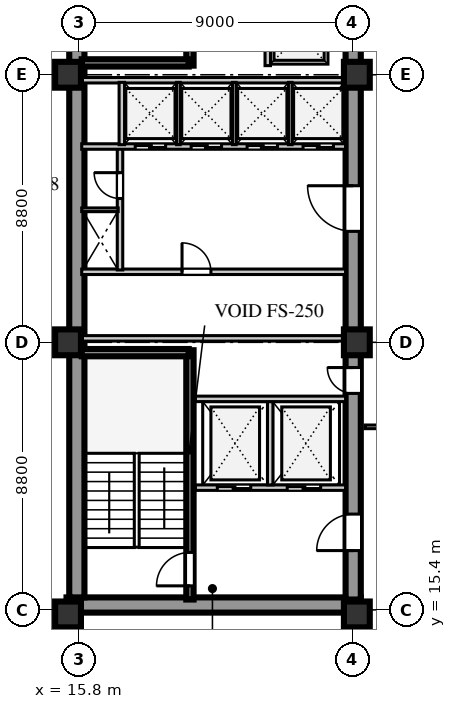
"""IFC4 building model, lengths in metres.
Left out: names, types, materials, properties, quantities, classifications, styles, units other than length and angle.
Written with IfcOpenShell. Run it as: python <this file> out.ifc"""

import sys

from ifc_helpers import new_model, si_unit, direction, frame, frame_2d, origin, origin_2d, place, context, subcontext, project, spatial, rectangle, extrude, element, fill, save


model = new_model("IFC4")
c1 = context("Model", 3, precision=1e-05, world=origin(), true_north=direction((0.0, 1.0)))
c2 = subcontext(c1, "Body", "Model", "MODEL_VIEW")
j1 = project(units=[si_unit("LENGTHUNIT", "METRE"), si_unit("PLANEANGLEUNIT", "RADIAN")], contexts=[c1])
p1 = place(None, origin())
s1 = spatial("IfcSite", under=j1, at=p1, CompositionType="ELEMENT")
p2 = place(p1, origin())
s2 = spatial("IfcBuilding", under=s1, at=p2, CompositionType="ELEMENT")
p3 = place(p2, frame((0.0, 0.0, 173.3)))
s3 = spatial("IfcBuildingStorey", under=s2, at=p3, CompositionType="ELEMENT", Elevation=173.3)
p4 = place(p3, frame((15.4, 15.56, 0.0), z_axis=(0.0, 0.0, 1.0), x_axis=(1.0, 0.0, 0.0)))
e1 = element("IfcWall", 1, at=p4, inside=s3, PredefinedType="SHEAR", context=c2, shape_type="SweptSolid", body=[
    extrude(rectangle(XDim=9.68, YDim=0.5, at=frame_2d((4.84, 0.0))), origin(), (0.0, 0.0, 1.0), 3.6),
])
p5 = place(p3, frame((15.74, 15.81, 0.0), z_axis=(0.0, 0.0, 1.0), x_axis=(0.0, 1.0, 0.0)))
e2 = element("IfcWall", 2, at=p5, inside=s3, PredefinedType="SHEAR", context=c2, shape_type="SweptSolid", body=[
    extrude(rectangle(XDim=25.63, YDim=0.5, at=frame_2d((12.815, 0.0))), origin(), (0.0, 0.0, 1.0), 3.6),
])
p6 = place(p3, frame((24.83, 15.74, 0.0), z_axis=(0.0, 0.0, 1.0), x_axis=(0.0, 1.0, 0.0)))
e3 = element("IfcWall", 3, at=p6, inside=s3, PredefinedType="SHEAR", context=c2, shape_type="SweptSolid", body=[
    extrude(rectangle(XDim=25.76, YDim=0.5, at=frame_2d((12.88, 0.0))), origin(), (0.0, 0.0, 1.0), 3.6),
])
p7 = place(p6, frame((1.61, 0.0, 0.0)))
e4 = element("IfcOpeningElement", 4, at=p7, cuts=e3, PredefinedType="OPENING", context=c2, shape_type="SweptSolid", body=[
    extrude(rectangle(XDim=1.2, YDim=2.1, at=frame_2d((0.6, 1.05))), frame((0.0, 0.26, 0.0), z_axis=(0.0, -1.0, 0.0), x_axis=(1.0, 0.0, 0.0)), (0.0, 0.0, 1.0), 0.52),
])
p8 = place(p6, frame((6.78, 0.0, 0.0)))
e5 = element("IfcOpeningElement", 5, at=p8, cuts=e3, PredefinedType="OPENING", context=c2, shape_type="SweptSolid", body=[
    extrude(rectangle(XDim=0.85, YDim=2.06, at=frame_2d((0.425, 1.03))), frame((0.0, 0.26, 0.0), z_axis=(0.0, -1.0, 0.0), x_axis=(1.0, 0.0, 0.0)), (0.0, 0.0, 1.0), 0.52),
])
p9 = place(p6, frame((12.11, 0.0, 0.0)))
e6 = element("IfcOpeningElement", 6, at=p9, cuts=e3, PredefinedType="OPENING", context=c2, shape_type="SweptSolid", body=[
    extrude(rectangle(XDim=1.5, YDim=2.12, at=frame_2d((0.75, 1.06))), frame((0.0, 0.26, 0.0), z_axis=(0.0, -1.0, 0.0), x_axis=(1.0, 0.0, 0.0)), (0.0, 0.0, 1.0), 0.52),
])
p10 = place(p6, frame((20.11, 0.0, 0.0)))
e7 = element("IfcOpeningElement", 7, at=p10, cuts=e3, PredefinedType="OPENING", context=c2, shape_type="SweptSolid", body=[
    extrude(rectangle(XDim=1.2, YDim=2.12, at=frame_2d((0.6, 1.06))), frame((0.0, 0.26, 0.0), z_axis=(0.0, -1.0, 0.0), x_axis=(1.0, 0.0, 0.0)), (0.0, 0.0, 1.0), 0.52),
])
p11 = place(p6, frame((24.01, 0.0, 0.0)))
e8 = element("IfcOpeningElement", 8, at=p11, cuts=e3, PredefinedType="OPENING", context=c2, shape_type="SweptSolid", body=[
    extrude(rectangle(XDim=0.95, YDim=2.1, at=frame_2d((0.475, 1.05))), frame((0.0, 0.26, 0.0), z_axis=(0.0, -1.0, 0.0), x_axis=(1.0, 0.0, 0.0)), (0.0, 0.0, 1.0), 0.52),
])
for number, where, z_axis, x_axis in (
    (9, (15.45, 15.25, 0.0), (0.0, 0.0, 1.0), (1.0, 0.0, 0.0)),
    (10, (15.45, 24.2, 0.0), (0.0, 0.0, 1.0), (1.0, 0.0, 0.0)),
    (11, (15.45, 33.0, 0.0), (0.0, 0.0, 1.0), (1.0, 0.0, 0.0)),
    (12, (24.95, 15.25, 0.0), (0.0, 0.0, 1.0), (1.0, 0.0, 0.0)),
    (13, (24.95, 24.2, 0.0), (0.0, 0.0, 1.0), (1.0, 0.0, 0.0)),
    (14, (24.95, 33.0, 0.0), (0.0, 0.0, 1.0), (1.0, 0.0, 0.0)),
):
    element("IfcColumn", number, at=place(p3, frame(where, z_axis=z_axis, x_axis=x_axis)), inside=s3, PredefinedType="COLUMN", context=c2, shape_type="SweptSolid", body=[
        extrude(rectangle(XDim=0.85, YDim=0.85, at=origin_2d()), origin(), (0.0, 0.0, 1.0), 3.6),
    ])
p12 = place(p3, frame((19.46, 15.74, 0.0), z_axis=(0.0, 0.0, 1.0), x_axis=(0.0, 1.0, 0.0)))
e15 = element("IfcWall", 15, at=p12, inside=s3, PredefinedType="SHEAR", context=c2, shape_type="SweptSolid", body=[
    extrude(rectangle(XDim=8.2, YDim=0.24, at=frame_2d((4.1, 0.0))), origin(), (0.0, 0.0, 1.0), 3.85),
])
p13 = place(p12, frame((0.45, 0.0, 0.0)))
e16 = element("IfcOpeningElement", 16, at=p13, cuts=e15, PredefinedType="OPENING", context=c2, shape_type="SweptSolid", body=[
    extrude(rectangle(XDim=1.1, YDim=2.1, at=frame_2d((0.55, 1.05))), frame((0.0, 0.13, 0.0), z_axis=(0.0, -1.0, 0.0), x_axis=(1.0, 0.0, 0.0)), (0.0, 0.0, 1.0), 0.26),
])
p14 = place(p3, frame((15.9, 23.86, 0.0), z_axis=(0.0, 0.0, 1.0), x_axis=(1.0, 0.0, 0.0)))
e17 = element("IfcWall", 17, at=p14, inside=s3, PredefinedType="SHEAR", context=c2, shape_type="SweptSolid", body=[
    extrude(rectangle(XDim=3.52, YDim=0.24, at=frame_2d((1.76, 0.0))), origin(), (0.0, 0.0, 1.0), 3.85),
])
p15 = place(p3, frame((19.64, 19.42, 0.0), z_axis=(0.0, 0.0, 1.0), x_axis=(1.0, 0.0, 0.0)))
e18 = element("IfcWall", 18, at=p15, inside=s3, PredefinedType="SOLIDWALL", context=c2, shape_type="SweptSolid", body=[
    extrude(rectangle(XDim=4.94, YDim=0.18, at=frame_2d((2.47, 0.0))), origin(), (0.0, 0.0, 1.0), 3.6),
])
p16 = place(p15, frame((0.72, 0.0, 0.0)))
e19 = element("IfcOpeningElement", 19, at=p16, cuts=e18, PredefinedType="OPENING", context=c2, shape_type="SweptSolid", body=[
    extrude(rectangle(XDim=1.1, YDim=2.1, at=frame_2d((0.55, 1.05))), frame((0.0, 0.1, 0.0), z_axis=(0.0, -1.0, 0.0), x_axis=(1.0, 0.0, 0.0)), (0.0, 0.0, 1.0), 0.2),
])
p17 = place(p15, frame((3.02, 0.0, 0.0)))
e20 = element("IfcOpeningElement", 20, at=p17, cuts=e18, PredefinedType="OPENING", context=c2, shape_type="SweptSolid", body=[
    extrude(rectangle(XDim=1.1, YDim=2.1, at=frame_2d((0.55, 1.05))), frame((0.0, 0.1, 0.0), z_axis=(0.0, -1.0, 0.0), x_axis=(1.0, 0.0, 0.0)), (0.0, 0.0, 1.0), 0.2),
])
p18 = place(p3, frame((22.1, 19.51, 0.0), z_axis=(0.0, 0.0, 1.0), x_axis=(0.0, 1.0, 0.0)))
e21 = element("IfcWall", 21, at=p18, inside=s3, PredefinedType="SOLIDWALL", context=c2, shape_type="SweptSolid", body=[
    extrude(rectangle(XDim=2.74, YDim=0.18, at=frame_2d((1.37, 0.0))), origin(), (0.0, 0.0, 1.0), 3.6),
])
p19 = place(p3, frame((19.64, 22.34, 0.0), z_axis=(0.0, 0.0, 1.0), x_axis=(1.0, 0.0, 0.0)))
e22 = element("IfcWall", 22, at=p19, inside=s3, PredefinedType="SOLIDWALL", context=c2, shape_type="SweptSolid", body=[
    extrude(rectangle(XDim=4.94, YDim=0.18, at=frame_2d((2.47, 0.0))), origin(), (0.0, 0.0, 1.0), 3.6),
])
p20 = place(p3, frame((15.9, 26.52, 0.0), z_axis=(0.0, 0.0, 1.0), x_axis=(1.0, 0.0, 0.0)))
e23 = element("IfcWall", 23, at=p20, inside=s3, PredefinedType="SOLIDWALL", context=c2, shape_type="SweptSolid", body=[
    extrude(rectangle(XDim=8.68, YDim=0.18, at=frame_2d((4.34, 0.0))), origin(), (0.0, 0.0, 1.0), 3.6),
])
p21 = place(p20, frame((3.3, 0.0, 0.0)))
e24 = element("IfcOpeningElement", 24, at=p21, cuts=e23, PredefinedType="OPENING", context=c2, shape_type="SweptSolid", body=[
    extrude(rectangle(XDim=0.95, YDim=2.1, at=frame_2d((0.475, 1.05))), frame((0.0, 0.1, 0.0), z_axis=(0.0, -1.0, 0.0), x_axis=(1.0, 0.0, 0.0)), (0.0, 0.0, 1.0), 0.2),
])
p22 = place(p3, frame((15.9, 24.33, 0.0), z_axis=(0.0, 0.0, 1.0), x_axis=(1.0, 0.0, 0.0)))
e25 = element("IfcWall", 25, at=p22, inside=s3, PredefinedType="SOLIDWALL", context=c2, shape_type="SweptSolid", body=[
    extrude(rectangle(XDim=8.68, YDim=0.18, at=frame_2d((4.34, 0.0))), origin(), (0.0, 0.0, 1.0), 2.95),
])
p23 = place(p3, frame((17.16, 26.58, 0.0), z_axis=(0.0, 0.0, 1.0), x_axis=(0.0, 1.0, 0.0)))
e26 = element("IfcWall", 26, at=p23, inside=s3, PredefinedType="SOLIDWALL", context=c2, shape_type="SweptSolid", body=[
    extrude(rectangle(XDim=4.02, YDim=0.18, at=frame_2d((2.01, 0.0))), origin(), (0.0, 0.0, 1.0), 3.6),
])
p24 = place(p23, frame((2.35, 0.0, 0.0)))
e27 = element("IfcOpeningElement", 27, at=p24, cuts=e26, PredefinedType="OPENING", context=c2, shape_type="SweptSolid", body=[
    extrude(rectangle(XDim=0.85, YDim=2.06, at=frame_2d((0.425, 1.03))), frame((0.0, 0.1, 0.0), z_axis=(0.0, -1.0, 0.0), x_axis=(1.0, 0.0, 0.0)), (0.0, 0.0, 1.0), 0.2),
])
p25 = place(p3, frame((15.9, 28.56, 0.0), z_axis=(0.0, 0.0, 1.0), x_axis=(1.0, 0.0, 0.0)))
e28 = element("IfcWall", 28, at=p25, inside=s3, PredefinedType="PARTITIONING", context=c2, shape_type="SweptSolid", body=[
    extrude(rectangle(XDim=1.2, YDim=0.12, at=frame_2d((0.6, 0.0))), origin(), (0.0, 0.0, 1.0), 3.6),
])
p26 = place(p3, frame((15.9, 30.64, 0.0), z_axis=(0.0, 0.0, 1.0), x_axis=(1.0, 0.0, 0.0)))
e29 = element("IfcWall", 29, at=p26, inside=s3, PredefinedType="SOLIDWALL", context=c2, shape_type="SweptSolid", body=[
    extrude(rectangle(XDim=8.68, YDim=0.18, at=frame_2d((4.34, 0.0))), origin(), (0.0, 0.0, 1.0), 3.6),
])
p27 = place(p26, frame((1.76, 0.0, 0.0)))
e30 = element("IfcOpeningElement", 30, at=p27, cuts=e29, PredefinedType="OPENING", context=c2, shape_type="SweptSolid", body=[
    extrude(rectangle(XDim=1.0, YDim=2.1, at=frame_2d((0.5, 1.05))), frame((0.0, 0.1, 0.0), z_axis=(0.0, -1.0, 0.0), x_axis=(1.0, 0.0, 0.0)), (0.0, 0.0, 1.0), 0.2),
])
p28 = place(p26, frame((3.6, 0.0, 0.0)))
e31 = element("IfcOpeningElement", 31, at=p28, cuts=e29, PredefinedType="OPENING", context=c2, shape_type="SweptSolid", body=[
    extrude(rectangle(XDim=1.0, YDim=2.1, at=frame_2d((0.5, 1.05))), frame((0.0, 0.1, 0.0), z_axis=(0.0, -1.0, 0.0), x_axis=(1.0, 0.0, 0.0)), (0.0, 0.0, 1.0), 0.2),
])
p29 = place(p26, frame((5.44, 0.0, 0.0)))
e32 = element("IfcOpeningElement", 32, at=p29, cuts=e29, PredefinedType="OPENING", context=c2, shape_type="SweptSolid", body=[
    extrude(rectangle(XDim=1.0, YDim=2.1, at=frame_2d((0.5, 1.05))), frame((0.0, 0.1, 0.0), z_axis=(0.0, -1.0, 0.0), x_axis=(1.0, 0.0, 0.0)), (0.0, 0.0, 1.0), 0.2),
])
p30 = place(p26, frame((7.28, 0.0, 0.0)))
e33 = element("IfcOpeningElement", 33, at=p30, cuts=e29, PredefinedType="OPENING", context=c2, shape_type="SweptSolid", body=[
    extrude(rectangle(XDim=1.0, YDim=2.1, at=frame_2d((0.5, 1.05))), frame((0.0, 0.1, 0.0), z_axis=(0.0, -1.0, 0.0), x_axis=(1.0, 0.0, 0.0)), (0.0, 0.0, 1.0), 0.2),
])
p31 = place(p3, frame((15.9, 32.82, 0.0), z_axis=(0.0, 0.0, 1.0), x_axis=(1.0, 0.0, 0.0)))
e34 = element("IfcWall", 34, at=p31, inside=s3, PredefinedType="SOLIDWALL", context=c2, shape_type="SweptSolid", body=[
    extrude(rectangle(XDim=8.68, YDim=0.18, at=frame_2d((4.34, 0.0))), origin(), (0.0, 0.0, 1.0), 2.95),
])
p32 = place(p3, frame((17.22, 30.7, 0.0), z_axis=(0.0, 0.0, 1.0), x_axis=(0.0, 1.0, 0.0)))
e35 = element("IfcWall", 35, at=p32, inside=s3, PredefinedType="SOLIDWALL", context=c2, shape_type="SweptSolid", body=[
    extrude(rectangle(XDim=2.05, YDim=0.18, at=frame_2d((1.025, 0.0))), origin(), (0.0, 0.0, 1.0), 3.6),
])
for number, where, z_axis, x_axis in (
    (36, (19.08, 30.7, 0.0), (0.0, 0.0, 1.0), (0.0, 1.0, 0.0)),
    (37, (20.92, 30.7, 0.0), (0.0, 0.0, 1.0), (0.0, 1.0, 0.0)),
    (38, (22.76, 30.7, 0.0), (0.0, 0.0, 1.0), (0.0, 1.0, 0.0)),
):
    element("IfcWall", number, at=place(p3, frame(where, z_axis=z_axis, x_axis=x_axis)), inside=s3, PredefinedType="PARTITIONING", context=c2, shape_type="SweptSolid", body=[
        extrude(rectangle(XDim=2.05, YDim=0.12, at=frame_2d((1.025, 0.0))), origin(), (0.0, 0.0, 1.0), 3.6),
    ])
p33 = place(p3, frame((19.46, 33.3, 0.0), z_axis=(0.0, 0.0, 1.0), x_axis=(0.0, 1.0, 0.0)))
e39 = element("IfcWall", 39, at=p33, inside=s3, PredefinedType="SHEAR", context=c2, shape_type="SweptSolid", body=[
    extrude(rectangle(XDim=8.18, YDim=0.24, at=frame_2d((4.09, 0.0))), origin(), (0.0, 0.0, 1.0), 3.85),
])
p34 = place(p33, frame((0.65, 0.0, 0.0)))
e40 = element("IfcOpeningElement", 40, at=p34, cuts=e39, PredefinedType="OPENING", context=c2, shape_type="SweptSolid", body=[
    extrude(rectangle(XDim=1.1, YDim=2.1, at=frame_2d((0.55, 1.05))), frame((0.0, 0.13, 0.0), z_axis=(0.0, -1.0, 0.0), x_axis=(1.0, 0.0, 0.0)), (0.0, 0.0, 1.0), 0.26),
])
p35 = place(p3, frame((15.9, 33.39, 0.0), z_axis=(0.0, 0.0, 1.0), x_axis=(1.0, 0.0, 0.0)))
e41 = element("IfcWall", 41, at=p35, inside=s3, PredefinedType="SHEAR", context=c2, shape_type="SweptSolid", body=[
    extrude(rectangle(XDim=3.52, YDim=0.24, at=frame_2d((1.76, 0.0))), origin(), (0.0, 0.0, 1.0), 3.85),
])
p36 = place(p3, frame((22.02, 33.3, 0.0), z_axis=(0.0, 0.0, 1.0), x_axis=(0.0, 1.0, 0.0)))
e42 = element("IfcWall", 42, at=p36, inside=s3, PredefinedType="SOLIDWALL", context=c2, shape_type="SweptSolid", body=[
    extrude(rectangle(XDim=2.01, YDim=0.18, at=frame_2d((1.005, 0.0))), origin(), (0.0, 0.0, 1.0), 3.6),
])
p37 = place(p3, frame((25.22, 21.42, 0.0), z_axis=(0.0, 0.0, 1.0), x_axis=(1.0, 0.0, 0.0)))
e43 = element("IfcWall", 43, at=p37, inside=s3, PredefinedType="PARTITIONING", context=c2, shape_type="SweptSolid", body=[
    extrude(rectangle(XDim=15.6, YDim=0.12, at=frame_2d((7.8, 0.0))), origin(), (0.0, 0.0, 1.0), 3.25),
])
p38 = place(p37, frame((0.73, 0.0, 0.0)))
e44 = element("IfcOpeningElement", 44, at=p38, cuts=e43, PredefinedType="OPENING", context=c2, shape_type="SweptSolid", body=[
    extrude(rectangle(XDim=0.95, YDim=2.1, at=frame_2d((0.475, 1.05))), frame((0.0, 0.07, 0.0), z_axis=(0.0, -1.0, 0.0), x_axis=(1.0, 0.0, 0.0)), (0.0, 0.0, 1.0), 0.14),
])
p39 = place(p37, frame((4.83, 0.0, 0.0)))
e45 = element("IfcOpeningElement", 45, at=p39, cuts=e43, PredefinedType="OPENING", context=c2, shape_type="SweptSolid", body=[
    extrude(rectangle(XDim=0.95, YDim=2.1, at=frame_2d((0.475, 1.05))), frame((0.0, 0.07, 0.0), z_axis=(0.0, -1.0, 0.0), x_axis=(1.0, 0.0, 0.0)), (0.0, 0.0, 1.0), 0.14),
])
p40 = place(p37, frame((10.23, 0.0, 0.0)))
e46 = element("IfcOpeningElement", 46, at=p40, cuts=e43, PredefinedType="OPENING", context=c2, shape_type="SweptSolid", body=[
    extrude(rectangle(XDim=0.95, YDim=2.1, at=frame_2d((0.475, 1.05))), frame((0.0, 0.07, 0.0), z_axis=(0.0, -1.0, 0.0), x_axis=(1.0, 0.0, 0.0)), (0.0, 0.0, 1.0), 0.14),
])
p41 = place(p13, origin())
e47 = element("IfcDoor", 47, at=p41, inside=s3, OperationType="SINGLE_SWING_LEFT", PredefinedType="DOOR", context=c2, shape_type="SweptSolid", body=[
    extrude(rectangle(XDim=1.1, YDim=2.1, at=frame_2d((0.55, 1.05))), frame((0.0, 0.025, 0.0), z_axis=(0.0, -1.0, 0.0), x_axis=(1.0, 0.0, 0.0)), (0.0, 0.0, 1.0), 0.05),
])
fill(e16, e47)
p42 = place(p16, origin())
e48 = element("IfcDoor", 48, at=p42, inside=s3, OperationType="DOUBLE_DOOR_SLIDING", PredefinedType="DOOR", context=c2, shape_type="SweptSolid", body=[
    extrude(rectangle(XDim=1.1, YDim=2.1, at=frame_2d((0.55, 1.05))), frame((0.0, 0.025, 0.0), z_axis=(0.0, -1.0, 0.0), x_axis=(1.0, 0.0, 0.0)), (0.0, 0.0, 1.0), 0.05),
])
fill(e19, e48)
p43 = place(p17, origin())
e49 = element("IfcDoor", 49, at=p43, inside=s3, OperationType="DOUBLE_DOOR_SLIDING", PredefinedType="DOOR", context=c2, shape_type="SweptSolid", body=[
    extrude(rectangle(XDim=1.1, YDim=2.1, at=frame_2d((0.55, 1.05))), frame((0.0, 0.025, 0.0), z_axis=(0.0, -1.0, 0.0), x_axis=(1.0, 0.0, 0.0)), (0.0, 0.0, 1.0), 0.05),
])
fill(e20, e49)
p44 = place(p7, frame((1.2, 0.0, 0.0), z_axis=(0.0, 0.0, 1.0), x_axis=(-1.0, 0.0, 0.0)))
e50 = element("IfcDoor", 50, at=p44, inside=s3, OperationType="SINGLE_SWING_RIGHT", PredefinedType="DOOR", context=c2, shape_type="SweptSolid", body=[
    extrude(rectangle(XDim=1.2, YDim=2.1, at=frame_2d((0.6, 1.05))), frame((0.0, 0.025, 0.0), z_axis=(0.0, -1.0, 0.0), x_axis=(1.0, 0.0, 0.0)), (0.0, 0.0, 1.0), 0.05),
])
fill(e4, e50)
p45 = place(p8, frame((0.85, 0.0, 0.0), z_axis=(0.0, 0.0, 1.0), x_axis=(-1.0, 0.0, 0.0)))
e51 = element("IfcDoor", 51, at=p45, inside=s3, OperationType="SINGLE_SWING_LEFT", PredefinedType="DOOR", context=c2, shape_type="SweptSolid", body=[
    extrude(rectangle(XDim=0.85, YDim=2.06, at=frame_2d((0.425, 1.03))), frame((0.0, 0.025, 0.0), z_axis=(0.0, -1.0, 0.0), x_axis=(1.0, 0.0, 0.0)), (0.0, 0.0, 1.0), 0.05),
])
fill(e5, e51)
p46 = place(p21, origin())
e52 = element("IfcDoor", 52, at=p46, inside=s3, OperationType="SINGLE_SWING_LEFT", PredefinedType="DOOR", context=c2, shape_type="SweptSolid", body=[
    extrude(rectangle(XDim=0.95, YDim=2.1, at=frame_2d((0.475, 1.05))), frame((0.0, 0.025, 0.0), z_axis=(0.0, -1.0, 0.0), x_axis=(1.0, 0.0, 0.0)), (0.0, 0.0, 1.0), 0.05),
])
fill(e24, e52)
p47 = place(p24, origin())
e53 = element("IfcDoor", 53, at=p47, inside=s3, OperationType="SINGLE_SWING_RIGHT", PredefinedType="DOOR", context=c2, shape_type="SweptSolid", body=[
    extrude(rectangle(XDim=0.85, YDim=2.06, at=frame_2d((0.425, 1.03))), frame((0.0, 0.025, 0.0), z_axis=(0.0, -1.0, 0.0), x_axis=(1.0, 0.0, 0.0)), (0.0, 0.0, 1.0), 0.05),
])
fill(e27, e53)
p48 = place(p9, frame((1.5, 0.0, 0.0), z_axis=(0.0, 0.0, 1.0), x_axis=(-1.0, 0.0, 0.0)))
e54 = element("IfcDoor", 54, at=p48, inside=s3, OperationType="SINGLE_SWING_LEFT", PredefinedType="DOOR", context=c2, shape_type="SweptSolid", body=[
    extrude(rectangle(XDim=1.5, YDim=2.12, at=frame_2d((0.75, 1.06))), frame((0.0, 0.025, 0.0), z_axis=(0.0, -1.0, 0.0), x_axis=(1.0, 0.0, 0.0)), (0.0, 0.0, 1.0), 0.05),
])
fill(e6, e54)
p49 = place(p27, frame((1.0, 0.0, 0.0), z_axis=(0.0, 0.0, 1.0), x_axis=(-1.0, 0.0, 0.0)))
e55 = element("IfcDoor", 55, at=p49, inside=s3, OperationType="DOUBLE_DOOR_SLIDING", PredefinedType="DOOR", context=c2, shape_type="SweptSolid", body=[
    extrude(rectangle(XDim=1.0, YDim=2.1, at=frame_2d((0.5, 1.05))), frame((0.0, 0.025, 0.0), z_axis=(0.0, -1.0, 0.0), x_axis=(1.0, 0.0, 0.0)), (0.0, 0.0, 1.0), 0.05),
])
fill(e30, e55)
p50 = place(p28, frame((1.0, 0.0, 0.0), z_axis=(0.0, 0.0, 1.0), x_axis=(-1.0, 0.0, 0.0)))
e56 = element("IfcDoor", 56, at=p50, inside=s3, OperationType="DOUBLE_DOOR_SLIDING", PredefinedType="DOOR", context=c2, shape_type="SweptSolid", body=[
    extrude(rectangle(XDim=1.0, YDim=2.1, at=frame_2d((0.5, 1.05))), frame((0.0, 0.025, 0.0), z_axis=(0.0, -1.0, 0.0), x_axis=(1.0, 0.0, 0.0)), (0.0, 0.0, 1.0), 0.05),
])
fill(e31, e56)
p51 = place(p29, frame((1.0, 0.0, 0.0), z_axis=(0.0, 0.0, 1.0), x_axis=(-1.0, 0.0, 0.0)))
e57 = element("IfcDoor", 57, at=p51, inside=s3, OperationType="DOUBLE_DOOR_SLIDING", PredefinedType="DOOR", context=c2, shape_type="SweptSolid", body=[
    extrude(rectangle(XDim=1.0, YDim=2.1, at=frame_2d((0.5, 1.05))), frame((0.0, 0.025, 0.0), z_axis=(0.0, -1.0, 0.0), x_axis=(1.0, 0.0, 0.0)), (0.0, 0.0, 1.0), 0.05),
])
fill(e32, e57)
p52 = place(p30, frame((1.0, 0.0, 0.0), z_axis=(0.0, 0.0, 1.0), x_axis=(-1.0, 0.0, 0.0)))
e58 = element("IfcDoor", 58, at=p52, inside=s3, OperationType="DOUBLE_DOOR_SLIDING", PredefinedType="DOOR", context=c2, shape_type="SweptSolid", body=[
    extrude(rectangle(XDim=1.0, YDim=2.1, at=frame_2d((0.5, 1.05))), frame((0.0, 0.025, 0.0), z_axis=(0.0, -1.0, 0.0), x_axis=(1.0, 0.0, 0.0)), (0.0, 0.0, 1.0), 0.05),
])
fill(e33, e58)
save(model, sys.argv[1])
